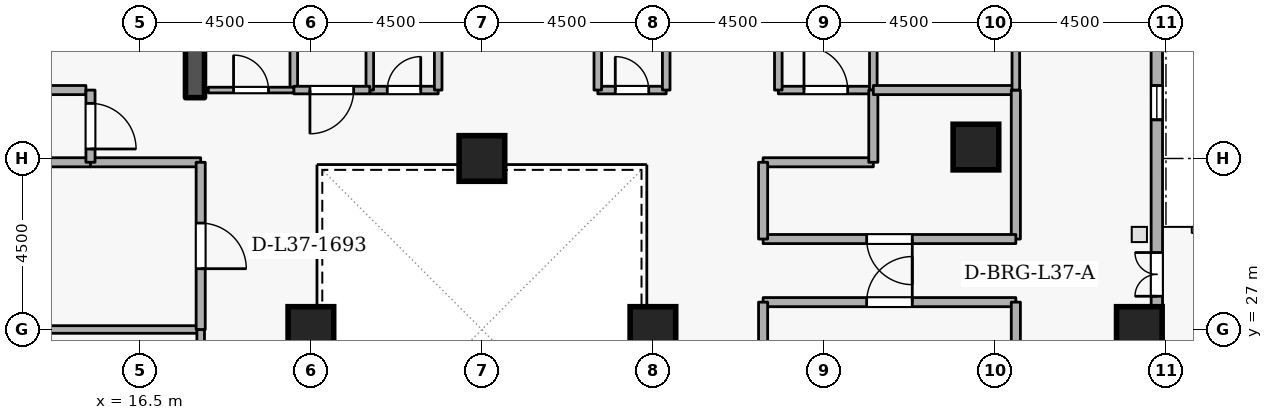
"""IFC4 building model, lengths in metres.
Left out: names, types, materials, properties, quantities, classifications, styles, units other than length and angle.
Written with IfcOpenShell. Run it as: python <this file> out.ifc"""

import sys

from ifc_helpers import new_model, si_unit, direction, frame, frame_2d, origin, origin_2d, place, context, subcontext, project, spatial, rectangle, extrude, element, fill, save


model = new_model("IFC4")
c1 = context("Model", 3, precision=1e-05, world=origin(), true_north=direction((0.0, 1.0)))
c2 = subcontext(c1, "Body", "Model", "MODEL_VIEW")
j1 = project(units=[si_unit("LENGTHUNIT", "METRE"), si_unit("PLANEANGLEUNIT", "RADIAN")], contexts=[c1])
p1 = place(None, origin())
s1 = spatial("IfcSite", under=j1, at=p1, CompositionType="ELEMENT")
p2 = place(p1, origin())
s2 = spatial("IfcBuilding", under=s1, at=p2, CompositionType="ELEMENT")
p3 = place(p2, frame((0.0, 0.0, 141.3)))
s3 = spatial("IfcBuildingStorey", under=s2, at=p3, CompositionType="ELEMENT", Elevation=141.3)
p4 = place(p3, frame((17.95, 33.1, 0.0), z_axis=(0.0, 0.0, 1.0), x_axis=(0.0, 1.0, 0.0)))
e1 = element("IfcWall", 1, at=p4, inside=s3, PredefinedType="SHEAR", context=c2, shape_type="SweptSolid", body=[
    extrude(rectangle(XDim=5.8, YDim=0.5, at=frame_2d((2.9, 0.0))), origin(), (0.0, 0.0, 1.0), 4.2),
])
for number, where, z_axis, x_axis in (
    (2, (42.8, 27.0, 0.0), (0.0, 0.0, 1.0), (1.0, 0.0, 0.0)),
    (3, (38.5, 31.8, 0.0), (0.0, 0.0, 1.0), (1.0, 0.0, 0.0)),
    (4, (25.5, 31.5, 0.0), (0.0, 0.0, 1.0), (1.0, 0.0, 0.0)),
    (5, (21.0, 27.0, 0.0), (0.0, 0.0, 1.0), (1.0, 0.0, 0.0)),
    (6, (30.0, 27.0, 0.0), (0.0, 0.0, 1.0), (1.0, 0.0, 0.0)),
):
    element("IfcColumn", number, at=place(p3, frame(where, z_axis=z_axis, x_axis=x_axis)), inside=s3, PredefinedType="COLUMN", context=c2, shape_type="SweptSolid", body=[
        extrude(rectangle(XDim=1.2, YDim=1.2, at=origin_2d()), origin(), (0.0, 0.0, 1.0), 4.2),
    ])
p5 = place(p3, frame((43.265, 5.819, 0.0), z_axis=(0.0, 0.0, 1.0), x_axis=(-0.000169493917, 0.999999985636, 0.0)))
e7 = element("IfcWall", 7, at=p5, inside=s3, PredefinedType="STANDARD", context=c2, shape_type="SweptSolid", body=[
    extrude(rectangle(XDim=34.57, YDim=0.3, at=frame_2d((17.285, 0.0))), origin(), (0.0, 0.0, 1.0), 3.3),
])
p6 = place(p5, frame((22.056, 0.0, 0.0)))
e8 = element("IfcOpeningElement", 8, at=p6, cuts=e7, PredefinedType="OPENING", context=c2, shape_type="SweptSolid", body=[
    extrude(rectangle(XDim=1.15, YDim=2.1, at=frame_2d((0.575, 1.05))), frame((0.0, 0.16, 0.0), z_axis=(0.0, -1.0, 0.0), x_axis=(1.0, 0.0, 0.0)), (0.0, 0.0, 1.0), 0.32),
])
p7 = place(p5, frame((2.7, 0.0, 0.72)))
e9 = element("IfcOpeningElement", 9, at=p7, cuts=e7, PredefinedType="OPENING", context=c2, shape_type="SweptSolid", body=[
    extrude(rectangle(XDim=0.9, YDim=1.75, at=frame_2d((0.45, 0.875))), frame((0.0, 0.16, 0.0), z_axis=(0.0, -1.0, 0.0), x_axis=(1.0, 0.0, 0.0)), (0.0, 0.0, 1.0), 0.32),
])
p8 = place(p5, frame((12.3, 0.0, 0.72)))
e10 = element("IfcOpeningElement", 10, at=p8, cuts=e7, PredefinedType="OPENING", context=c2, shape_type="SweptSolid", body=[
    extrude(rectangle(XDim=0.9, YDim=1.75, at=frame_2d((0.45, 0.875))), frame((0.0, 0.16, 0.0), z_axis=(0.0, -1.0, 0.0), x_axis=(1.0, 0.0, 0.0)), (0.0, 0.0, 1.0), 0.32),
])
p9 = place(p5, frame((26.7, 0.0, 0.72)))
e11 = element("IfcOpeningElement", 11, at=p9, cuts=e7, PredefinedType="OPENING", context=c2, shape_type="SweptSolid", body=[
    extrude(rectangle(XDim=0.9, YDim=1.75, at=frame_2d((0.45, 0.875))), frame((0.0, 0.16, 0.0), z_axis=(0.0, -1.0, 0.0), x_axis=(1.0, 0.0, 0.0)), (0.0, 0.0, 1.0), 0.32),
])
p10 = place(p5, frame((31.5, 0.0, 0.72)))
e12 = element("IfcOpeningElement", 12, at=p10, cuts=e7, PredefinedType="OPENING", context=c2, shape_type="SweptSolid", body=[
    extrude(rectangle(XDim=0.9, YDim=1.75, at=frame_2d((0.45, 0.875))), frame((0.0, 0.16, 0.0), z_axis=(0.0, -1.0, 0.0), x_axis=(1.0, 0.0, 0.0)), (0.0, 0.0, 1.0), 0.32),
])
p11 = place(p3, frame((33.3, 33.3, 0.0), z_axis=(0.0, 0.0, 1.0), x_axis=(1.0, 0.0, 0.0)))
e13 = element("IfcWall", 13, at=p11, inside=s3, PredefinedType="STANDARD", context=c2, shape_type="SweptSolid", body=[
    extrude(rectangle(XDim=2.5, YDim=0.2, at=frame_2d((1.25, 0.0))), origin(), (0.0, 0.0, 1.0), 3.94),
])
p12 = place(p11, frame((0.675, 0.0, 0.0)))
e14 = element("IfcOpeningElement", 14, at=p12, cuts=e13, PredefinedType="OPENING", context=c2, shape_type="SweptSolid", body=[
    extrude(rectangle(XDim=1.15, YDim=2.1, at=frame_2d((0.575, 1.05))), frame((0.0, 0.11, 0.0), z_axis=(0.0, -1.0, 0.0), x_axis=(1.0, 0.0, 0.0)), (0.0, 0.0, 1.0), 0.22),
])
p13 = place(p3, frame((35.8, 33.3, 0.0), z_axis=(0.0, 0.0, 1.0), x_axis=(0.0, 1.0, 0.0)))
e15 = element("IfcWall", 15, at=p13, inside=s3, PredefinedType="STANDARD", context=c2, shape_type="SweptSolid", body=[
    extrude(rectangle(XDim=5.7, YDim=0.2, at=frame_2d((2.85, 0.0))), origin(), (0.0, 0.0, 1.0), 3.94),
])
p14 = place(p13, frame((2.275, 0.0, 0.0)))
e16 = element("IfcOpeningElement", 16, at=p14, cuts=e15, PredefinedType="OPENING", context=c2, shape_type="SweptSolid", body=[
    extrude(rectangle(XDim=1.15, YDim=2.1, at=frame_2d((0.575, 1.05))), frame((0.0, 0.11, 0.0), z_axis=(0.0, -1.0, 0.0), x_axis=(1.0, 0.0, 0.0)), (0.0, 0.0, 1.0), 0.22),
])
p15 = place(p3, frame((33.3, 35.6, 0.0), z_axis=(0.0, 0.0, 1.0), x_axis=(0.0, -1.0, 0.0)))
e17 = element("IfcWall", 17, at=p15, inside=s3, PredefinedType="STANDARD", context=c2, shape_type="SweptSolid", body=[
    extrude(rectangle(XDim=2.3, YDim=0.2, at=frame_2d((1.15, 0.0))), origin(), (0.0, 0.0, 1.0), 3.145),
])
p16 = place(p3, frame((22.55, 33.3, 0.0), z_axis=(0.0, 0.0, 1.0), x_axis=(1.0, 0.0, 0.0)))
e18 = element("IfcWall", 18, at=p16, inside=s3, PredefinedType="STANDARD", context=c2, shape_type="SweptSolid", body=[
    extrude(rectangle(XDim=1.8, YDim=0.2, at=frame_2d((0.9, 0.0))), origin(), (0.0, 0.0, 1.0), 3.94),
])
p17 = place(p16, frame((0.46, 0.0, 0.0)))
e19 = element("IfcOpeningElement", 19, at=p17, cuts=e18, PredefinedType="OPENING", context=c2, shape_type="SweptSolid", body=[
    extrude(rectangle(XDim=0.88, YDim=2.04, at=frame_2d((0.44, 1.02))), frame((0.0, 0.11, 0.0), z_axis=(0.0, -1.0, 0.0), x_axis=(1.0, 0.0, 0.0)), (0.0, 0.0, 1.0), 0.22),
])
for number, where, z_axis, x_axis in (
    (20, (24.35, 33.3, 0.0), (0.0, 0.0, 1.0), (0.0, 1.0, 0.0)),
    (21, (22.55, 35.35, 0.0), (0.0, 0.0, 1.0), (0.0, -1.0, 0.0)),
):
    element("IfcWall", number, at=place(p3, frame(where, z_axis=z_axis, x_axis=x_axis)), inside=s3, PredefinedType="STANDARD", context=c2, shape_type="SweptSolid", body=[
        extrude(rectangle(XDim=2.05, YDim=0.2, at=frame_2d((1.025, 0.0))), origin(), (0.0, 0.0, 1.0), 3.94),
    ])
p18 = place(p3, frame((28.55, 33.3, 0.0), z_axis=(0.0, 0.0, 1.0), x_axis=(1.0, 0.0, 0.0)))
e22 = element("IfcWall", 22, at=p18, inside=s3, PredefinedType="STANDARD", context=c2, shape_type="SweptSolid", body=[
    extrude(rectangle(XDim=1.8, YDim=0.2, at=frame_2d((0.9, 0.0))), origin(), (0.0, 0.0, 1.0), 3.94),
])
p19 = place(p18, frame((0.46, 0.0, 0.0)))
e23 = element("IfcOpeningElement", 23, at=p19, cuts=e22, PredefinedType="OPENING", context=c2, shape_type="SweptSolid", body=[
    extrude(rectangle(XDim=0.88, YDim=2.04, at=frame_2d((0.44, 1.02))), frame((0.0, 0.11, 0.0), z_axis=(0.0, -1.0, 0.0), x_axis=(1.0, 0.0, 0.0)), (0.0, 0.0, 1.0), 0.22),
])
for number, where, z_axis, x_axis in (
    (24, (30.35, 33.3, 0.0), (0.0, 0.0, 1.0), (0.0, 1.0, 0.0)),
    (25, (28.55, 35.35, 0.0), (0.0, 0.0, 1.0), (0.0, -1.0, 0.0)),
    (26, (20.55, 33.3, 0.0), (0.0, 0.0, 1.0), (0.0, 1.0, 0.0)),
):
    element("IfcWall", number, at=place(p3, frame(where, z_axis=z_axis, x_axis=x_axis)), inside=s3, PredefinedType="STANDARD", context=c2, shape_type="SweptSolid", body=[
        extrude(rectangle(XDim=2.05, YDim=0.2, at=frame_2d((1.025, 0.0))), origin(), (0.0, 0.0, 1.0), 3.94),
    ])
p20 = place(p3, frame((22.55, 33.3, 0.0), z_axis=(0.0, 0.0, 1.0), x_axis=(-1.0, 0.0, 0.0)))
e27 = element("IfcWall", 27, at=p20, inside=s3, PredefinedType="STANDARD", context=c2, shape_type="SweptSolid", body=[
    extrude(rectangle(XDim=2.0, YDim=0.2, at=frame_2d((1.0, 0.0))), origin(), (0.0, 0.0, 1.0), 3.94),
])
p21 = place(p20, frame((0.425, 0.0, 0.0)))
e28 = element("IfcOpeningElement", 28, at=p21, cuts=e27, PredefinedType="OPENING", context=c2, shape_type="SweptSolid", body=[
    extrude(rectangle(XDim=1.15, YDim=2.1, at=frame_2d((0.575, 1.05))), frame((0.0, 0.11, 0.0), z_axis=(0.0, -1.0, 0.0), x_axis=(1.0, 0.0, 0.0)), (0.0, 0.0, 1.0), 0.22),
])
p22 = place(p3, frame((32.9, 27.72, 0.0), z_axis=(0.0, 0.0, 1.0), x_axis=(1.0, 0.0, 0.0)))
e29 = element("IfcWall", 29, at=p22, inside=s3, PredefinedType="STANDARD", context=c2, shape_type="SweptSolid", body=[
    extrude(rectangle(XDim=6.65, YDim=0.24, at=frame_2d((3.325, 0.0))), origin(), (0.0, 0.0, 1.0), 3.94),
])
p23 = place(p22, frame((2.725, 0.0, 0.0)))
e30 = element("IfcOpeningElement", 30, at=p23, cuts=e29, PredefinedType="OPENING", context=c2, shape_type="SweptSolid", body=[
    extrude(rectangle(XDim=1.2, YDim=2.1, at=frame_2d((0.6, 1.05))), frame((0.0, 0.13, 0.0), z_axis=(0.0, -1.0, 0.0), x_axis=(1.0, 0.0, 0.0)), (0.0, 0.0, 1.0), 0.26),
])
p24 = place(p3, frame((39.55, 27.72, 0.0), z_axis=(0.0, 0.0, 1.0), x_axis=(0.0, -1.0, 0.0)))
e31 = element("IfcWall", 31, at=p24, inside=s3, PredefinedType="STANDARD", context=c2, shape_type="SweptSolid", body=[
    extrude(rectangle(XDim=5.12, YDim=0.24, at=frame_2d((2.56, 0.0))), origin(), (0.0, 0.0, 1.0), 3.94),
])
p25 = place(p3, frame((32.9, 22.6, 0.0), z_axis=(0.0, 0.0, 1.0), x_axis=(0.0, 1.0, 0.0)))
e32 = element("IfcWall", 32, at=p25, inside=s3, PredefinedType="STANDARD", context=c2, shape_type="SweptSolid", body=[
    extrude(rectangle(XDim=5.12, YDim=0.24, at=frame_2d((2.56, 0.0))), origin(), (0.0, 0.0, 1.0), 3.145),
])
p26 = place(p3, frame((32.9, 31.4, 0.0), z_axis=(0.0, 0.0, 1.0), x_axis=(1.0, 0.0, 0.0)))
e33 = element("IfcWall", 33, at=p26, inside=s3, PredefinedType="STANDARD", context=c2, shape_type="SweptSolid", body=[
    extrude(rectangle(XDim=2.9, YDim=0.24, at=frame_2d((1.45, 0.0))), origin(), (0.0, 0.0, 1.0), 3.94),
])
p27 = place(p3, frame((35.8, 31.4, 0.0), z_axis=(0.0, 0.0, 1.0), x_axis=(0.0, 1.0, 0.0)))
e34 = element("IfcWall", 34, at=p27, inside=s3, PredefinedType="STANDARD", context=c2, shape_type="SweptSolid", body=[
    extrude(rectangle(XDim=1.9, YDim=0.24, at=frame_2d((0.95, 0.0))), origin(), (0.0, 0.0, 1.0), 3.94),
])
p28 = place(p3, frame((35.8, 33.3, 0.0), z_axis=(0.0, 0.0, 1.0), x_axis=(1.0, 0.0, 0.0)))
e35 = element("IfcWall", 35, at=p28, inside=s3, PredefinedType="STANDARD", context=c2, shape_type="SweptSolid", body=[
    extrude(rectangle(XDim=3.75, YDim=0.24, at=frame_2d((1.875, 0.0))), origin(), (0.0, 0.0, 1.0), 3.94),
])
p29 = place(p3, frame((39.55, 33.3, 0.0), z_axis=(0.0, 0.0, 1.0), x_axis=(0.0, -1.0, 0.0)))
e36 = element("IfcWall", 36, at=p29, inside=s3, PredefinedType="STANDARD", context=c2, shape_type="SweptSolid", body=[
    extrude(rectangle(XDim=3.92, YDim=0.24, at=frame_2d((1.96, 0.0))), origin(), (0.0, 0.0, 1.0), 3.94),
])
p30 = place(p3, frame((39.55, 29.38, 0.0), z_axis=(0.0, 0.0, 1.0), x_axis=(-1.0, 0.0, 0.0)))
e37 = element("IfcWall", 37, at=p30, inside=s3, PredefinedType="STANDARD", context=c2, shape_type="SweptSolid", body=[
    extrude(rectangle(XDim=6.65, YDim=0.24, at=frame_2d((3.325, 0.0))), origin(), (0.0, 0.0, 1.0), 3.94),
])
p31 = place(p30, frame((2.725, 0.0, 0.0)))
e38 = element("IfcOpeningElement", 38, at=p31, cuts=e37, PredefinedType="OPENING", context=c2, shape_type="SweptSolid", body=[
    extrude(rectangle(XDim=1.2, YDim=2.1, at=frame_2d((0.6, 1.05))), frame((0.0, 0.13, 0.0), z_axis=(0.0, -1.0, 0.0), x_axis=(1.0, 0.0, 0.0)), (0.0, 0.0, 1.0), 0.26),
])
p32 = place(p3, frame((32.9, 29.38, 0.0), z_axis=(0.0, 0.0, 1.0), x_axis=(0.0, 1.0, 0.0)))
e39 = element("IfcWall", 39, at=p32, inside=s3, PredefinedType="STANDARD", context=c2, shape_type="SweptSolid", body=[
    extrude(rectangle(XDim=2.02, YDim=0.24, at=frame_2d((1.01, 0.0))), origin(), (0.0, 0.0, 1.0), 3.145),
])
p33 = place(p3, frame((5.45, 27.0, 0.0), z_axis=(0.0, 0.0, 1.0), x_axis=(1.0, 0.0, 0.0)))
e40 = element("IfcWall", 40, at=p33, inside=s3, PredefinedType="STANDARD", context=c2, shape_type="SweptSolid", body=[
    extrude(rectangle(XDim=12.65, YDim=0.2, at=frame_2d((6.325, 0.0))), origin(), (0.0, 0.0, 1.0), 3.325),
])
p34 = place(p3, frame((18.1, 27.0, 0.0), z_axis=(0.0, 0.0, 1.0), x_axis=(0.0, -1.0, 0.0)))
e41 = element("IfcWall", 41, at=p34, inside=s3, PredefinedType="STANDARD", context=c2, shape_type="SweptSolid", body=[
    extrude(rectangle(XDim=4.4, YDim=0.2, at=frame_2d((2.2, 0.0))), origin(), (0.0, 0.0, 1.0), 3.145),
])
p35 = place(p3, frame((39.55, 38.905, 0.0), z_axis=(0.0, 0.0, 1.0), x_axis=(0.0, -1.0, 0.0)))
e42 = element("IfcWall", 42, at=p35, inside=s3, PredefinedType="STANDARD", context=c2, shape_type="SweptSolid", body=[
    extrude(rectangle(XDim=5.605, YDim=0.2, at=frame_2d((2.803, 0.0))), origin(), (0.0, 0.0, 1.0), 3.94),
])
p36 = place(p3, frame((5.5, 31.4, 0.0), z_axis=(0.0, 0.0, 1.0), x_axis=(1.0, 0.0, 0.0)))
e43 = element("IfcWall", 43, at=p36, inside=s3, PredefinedType="STANDARD", context=c2, shape_type="SweptSolid", body=[
    extrude(rectangle(XDim=9.7, YDim=0.24, at=frame_2d((4.85, 0.0))), origin(), (0.0, 0.0, 1.0), 3.94),
])
p37 = place(p3, frame((15.2, 31.4, 0.0), z_axis=(0.0, 0.0, 1.0), x_axis=(1.0, 0.0, 0.0)))
e44 = element("IfcWall", 44, at=p37, inside=s3, PredefinedType="STANDARD", context=c2, shape_type="SweptSolid", body=[
    extrude(rectangle(XDim=2.9, YDim=0.24, at=frame_2d((1.45, 0.0))), origin(), (0.0, 0.0, 1.0), 3.94),
])
p38 = place(p3, frame((18.1, 31.4, 0.0), z_axis=(0.0, 0.0, 1.0), x_axis=(0.0, -1.0, 0.0)))
e45 = element("IfcWall", 45, at=p38, inside=s3, PredefinedType="STANDARD", context=c2, shape_type="SweptSolid", body=[
    extrude(rectangle(XDim=4.4, YDim=0.24, at=frame_2d((2.2, 0.0))), origin(), (0.0, 0.0, 1.0), 3.145),
])
p39 = place(p38, frame((1.6, 0.0, 0.0)))
e46 = element("IfcOpeningElement", 46, at=p39, cuts=e45, PredefinedType="OPENING", context=c2, shape_type="SweptSolid", body=[
    extrude(rectangle(XDim=1.2, YDim=2.1, at=frame_2d((0.6, 1.05))), frame((0.0, 0.13, 0.0), z_axis=(0.0, -1.0, 0.0), x_axis=(1.0, 0.0, 0.0)), (0.0, 0.0, 1.0), 0.26),
])
p40 = place(p3, frame((11.02, 33.3, 0.0), z_axis=(0.0, 0.0, 1.0), x_axis=(1.0, 0.0, 0.0)))
e47 = element("IfcWall", 47, at=p40, inside=s3, PredefinedType="STANDARD", context=c2, shape_type="SweptSolid", body=[
    extrude(rectangle(XDim=4.06, YDim=0.24, at=frame_2d((2.03, 0.0))), origin(), (0.0, 0.0, 1.0), 3.94),
])
p41 = place(p3, frame((15.2, 33.3, 0.0), z_axis=(0.0, 0.0, 1.0), x_axis=(0.0, -1.0, 0.0)))
e48 = element("IfcWall", 48, at=p41, inside=s3, PredefinedType="STANDARD", context=c2, shape_type="SweptSolid", body=[
    extrude(rectangle(XDim=1.9, YDim=0.24, at=frame_2d((0.95, 0.0))), origin(), (0.0, 0.0, 1.0), 3.94),
])
p42 = place(p41, frame((0.35, 0.0, 0.0)))
e49 = element("IfcOpeningElement", 49, at=p42, cuts=e48, PredefinedType="OPENING", context=c2, shape_type="SweptSolid", body=[
    extrude(rectangle(XDim=1.2, YDim=2.1, at=frame_2d((0.6, 1.05))), frame((0.0, 0.13, 0.0), z_axis=(0.0, -1.0, 0.0), x_axis=(1.0, 0.0, 0.0)), (0.0, 0.0, 1.0), 0.26),
])
p43 = place(p3, frame((18.3, 33.3, 0.0), z_axis=(0.0, 0.0, 1.0), x_axis=(1.0, 0.0, 0.0)))
e50 = element("IfcWall", 50, at=p43, inside=s3, PredefinedType="PARTITIONING", context=c2, shape_type="SweptSolid", body=[
    extrude(rectangle(XDim=2.25, YDim=0.15, at=frame_2d((1.125, 0.0))), origin(), (0.0, 0.0, 1.0), 3.94),
])
p44 = place(p43, frame((0.665, 0.0, 0.0)))
e51 = element("IfcOpeningElement", 51, at=p44, cuts=e50, PredefinedType="OPENING", context=c2, shape_type="SweptSolid", body=[
    extrude(rectangle(XDim=0.92, YDim=2.08, at=frame_2d((0.46, 1.04))), frame((0.0, 0.085, 0.0), z_axis=(0.0, -1.0, 0.0), x_axis=(1.0, 0.0, 0.0)), (0.0, 0.0, 1.0), 0.17),
])
p45 = place(p6, origin())
e52 = element("IfcDoor", 52, at=p45, inside=s3, OperationType="DOUBLE_DOOR_SINGLE_SWING", PredefinedType="DOOR", context=c2, shape_type="SweptSolid", body=[
    extrude(rectangle(XDim=1.15, YDim=2.1, at=frame_2d((0.575, 1.05))), frame((0.0, 0.025, 0.0), z_axis=(0.0, -1.0, 0.0), x_axis=(1.0, 0.0, 0.0)), (0.0, 0.0, 1.0), 0.05),
])
fill(e8, e52)
p46 = place(p9, origin())
e53 = element("IfcWindow", 53, at=p46, inside=s3, PartitioningType="SINGLE_PANEL", PredefinedType="WINDOW", context=c2, shape_type="SweptSolid", body=[
    extrude(rectangle(XDim=0.9, YDim=1.75, at=frame_2d((0.45, 0.875))), frame((0.0, 0.03, 0.0), z_axis=(0.0, -1.0, 0.0), x_axis=(1.0, 0.0, 0.0)), (0.0, 0.0, 1.0), 0.06),
])
fill(e11, e53)
p47 = place(p12, origin())
e54 = element("IfcDoor", 54, at=p47, inside=s3, OperationType="SINGLE_SWING_LEFT", PredefinedType="DOOR", context=c2, shape_type="SweptSolid", body=[
    extrude(rectangle(XDim=1.15, YDim=2.1, at=frame_2d((0.575, 1.05))), frame((0.0, 0.025, 0.0), z_axis=(0.0, -1.0, 0.0), x_axis=(1.0, 0.0, 0.0)), (0.0, 0.0, 1.0), 0.05),
])
fill(e14, e54)
p48 = place(p17, origin())
e55 = element("IfcDoor", 55, at=p48, inside=s3, OperationType="SINGLE_SWING_RIGHT", PredefinedType="DOOR", context=c2, shape_type="SweptSolid", body=[
    extrude(rectangle(XDim=0.88, YDim=2.04, at=frame_2d((0.44, 1.02))), frame((0.0, 0.025, 0.0), z_axis=(0.0, -1.0, 0.0), x_axis=(1.0, 0.0, 0.0)), (0.0, 0.0, 1.0), 0.05),
])
fill(e19, e55)
p49 = place(p19, origin())
e56 = element("IfcDoor", 56, at=p49, inside=s3, OperationType="SINGLE_SWING_LEFT", PredefinedType="DOOR", context=c2, shape_type="SweptSolid", body=[
    extrude(rectangle(XDim=0.88, YDim=2.04, at=frame_2d((0.44, 1.02))), frame((0.0, 0.025, 0.0), z_axis=(0.0, -1.0, 0.0), x_axis=(1.0, 0.0, 0.0)), (0.0, 0.0, 1.0), 0.05),
])
fill(e23, e56)
p50 = place(p44, origin())
e57 = element("IfcDoor", 57, at=p50, inside=s3, OperationType="SINGLE_SWING_LEFT", PredefinedType="DOOR", context=c2, shape_type="SweptSolid", body=[
    extrude(rectangle(XDim=0.92, YDim=2.08, at=frame_2d((0.46, 1.04))), frame((0.0, 0.025, 0.0), z_axis=(0.0, -1.0, 0.0), x_axis=(1.0, 0.0, 0.0)), (0.0, 0.0, 1.0), 0.05),
])
fill(e51, e57)
p51 = place(p21, origin())
e58 = element("IfcDoor", 58, at=p51, inside=s3, OperationType="SINGLE_SWING_RIGHT", PredefinedType="DOOR", context=c2, shape_type="SweptSolid", body=[
    extrude(rectangle(XDim=1.15, YDim=2.1, at=frame_2d((0.575, 1.05))), frame((0.0, 0.025, 0.0), z_axis=(0.0, -1.0, 0.0), x_axis=(1.0, 0.0, 0.0)), (0.0, 0.0, 1.0), 0.05),
])
fill(e28, e58)
p52 = place(p23, origin())
e59 = element("IfcDoor", 59, at=p52, inside=s3, OperationType="SINGLE_SWING_RIGHT", PredefinedType="DOOR", context=c2, shape_type="SweptSolid", body=[
    extrude(rectangle(XDim=1.2, YDim=2.1, at=frame_2d((0.6, 1.05))), frame((0.0, 0.025, 0.0), z_axis=(0.0, -1.0, 0.0), x_axis=(1.0, 0.0, 0.0)), (0.0, 0.0, 1.0), 0.05),
])
fill(e30, e59)
p53 = place(p31, origin())
e60 = element("IfcDoor", 60, at=p53, inside=s3, OperationType="SINGLE_SWING_LEFT", PredefinedType="DOOR", context=c2, shape_type="SweptSolid", body=[
    extrude(rectangle(XDim=1.2, YDim=2.1, at=frame_2d((0.6, 1.05))), frame((0.0, 0.025, 0.0), z_axis=(0.0, -1.0, 0.0), x_axis=(1.0, 0.0, 0.0)), (0.0, 0.0, 1.0), 0.05),
])
fill(e38, e60)
p54 = place(p39, origin())
e61 = element("IfcDoor", 61, at=p54, inside=s3, OperationType="SINGLE_SWING_RIGHT", PredefinedType="DOOR", context=c2, shape_type="SweptSolid", body=[
    extrude(rectangle(XDim=1.2, YDim=2.1, at=frame_2d((0.6, 1.05))), frame((0.0, 0.025, 0.0), z_axis=(0.0, -1.0, 0.0), x_axis=(1.0, 0.0, 0.0)), (0.0, 0.0, 1.0), 0.05),
])
fill(e46, e61)
p55 = place(p42, origin())
e62 = element("IfcDoor", 62, at=p55, inside=s3, OperationType="SINGLE_SWING_RIGHT", PredefinedType="DOOR", context=c2, shape_type="SweptSolid", body=[
    extrude(rectangle(XDim=1.2, YDim=2.1, at=frame_2d((0.6, 1.05))), frame((0.0, 0.025, 0.0), z_axis=(0.0, -1.0, 0.0), x_axis=(1.0, 0.0, 0.0)), (0.0, 0.0, 1.0), 0.05),
])
fill(e49, e62)
save(model, sys.argv[1])
